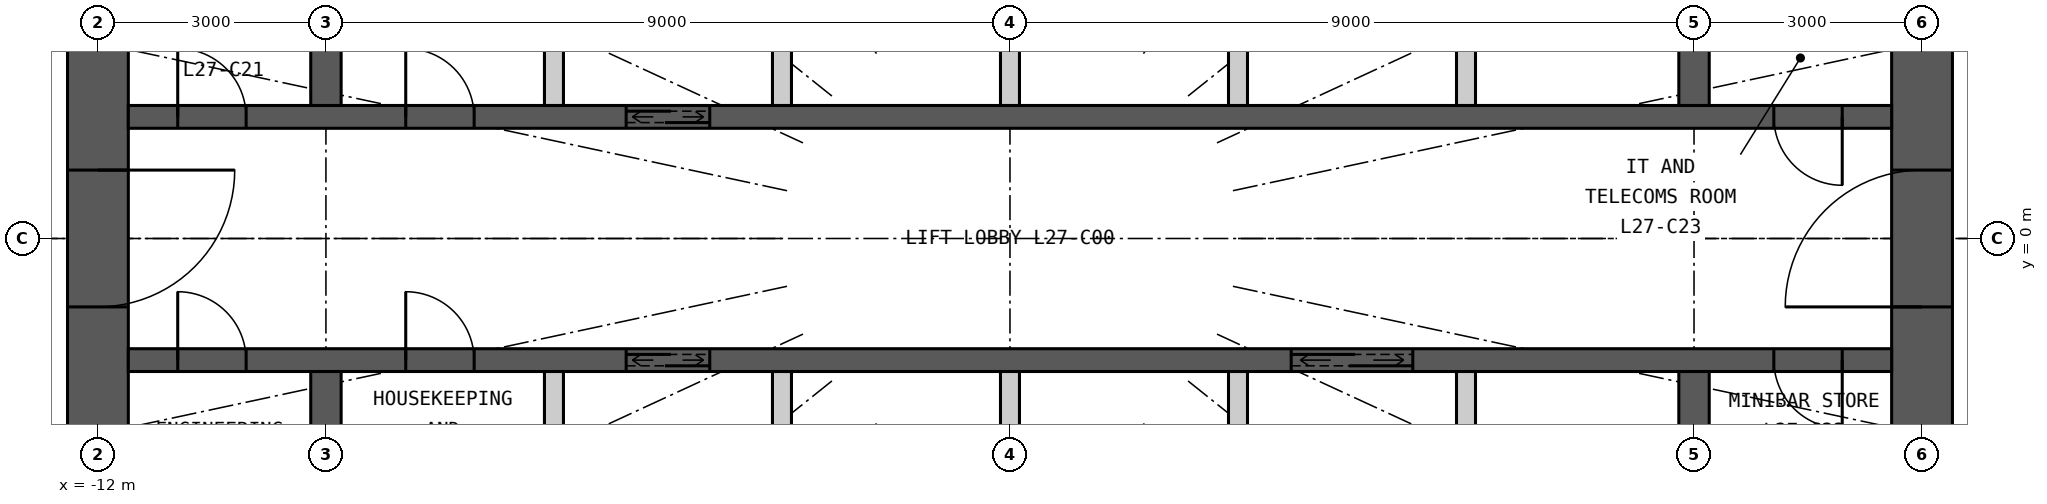
"""IFC4 building model, lengths in metres.
Left out: names, types, materials, properties, quantities, classifications, styles, units other than length and angle.
Written with IfcOpenShell. Run it as: python <this file> out.ifc"""

import sys

from ifc_helpers import new_model, si_unit, direction, frame, frame_2d, origin, place, context, subcontext, project, spatial, rectangle, extrude, element, fill, save


model = new_model("IFC4")
c1 = context("Model", 3, precision=1e-05, world=origin(), true_north=direction((0.0, 1.0)))
c2 = subcontext(c1, "Body", "Model", "MODEL_VIEW")
j1 = project(units=[si_unit("LENGTHUNIT", "METRE"), si_unit("PLANEANGLEUNIT", "RADIAN")], contexts=[c1])
p1 = place(None, origin())
s1 = spatial("IfcSite", under=j1, at=p1, CompositionType="ELEMENT")
p2 = place(p1, origin())
s2 = spatial("IfcBuilding", under=s1, at=p2, CompositionType="ELEMENT")
p3 = place(p2, frame((0.0, 0.0, 108.9)))
s3 = spatial("IfcBuildingStorey", under=s2, at=p3, CompositionType="ELEMENT", Elevation=108.9)
p4 = place(p3, frame((12.0, -7.6, 0.0), z_axis=(0.0, 0.0, 1.0), x_axis=(0.0, 1.0, 0.0)))
e1 = element("IfcWall", 1, at=p4, inside=s3, PredefinedType="SHEAR", context=c2, shape_type="SweptSolid", body=[
    extrude(rectangle(XDim=15.2, YDim=0.8, at=frame_2d((7.6, 0.0))), origin(), (0.0, 0.0, 1.0), 3.3),
])
p5 = place(p4, frame((6.7, 0.0, 0.0)))
e2 = element("IfcOpeningElement", 2, at=p5, cuts=e1, PredefinedType="OPENING", context=c2, shape_type="SweptSolid", body=[
    extrude(rectangle(XDim=1.8, YDim=2.2, at=frame_2d((0.9, 1.1))), frame((0.0, 0.41, 0.0), z_axis=(0.0, -1.0, 0.0), x_axis=(1.0, 0.0, 0.0)), (0.0, 0.0, 1.0), 0.82),
])
p6 = place(p3, frame((-12.0, 7.6, 0.0), z_axis=(0.0, 0.0, 1.0), x_axis=(0.0, -1.0, 0.0)))
e3 = element("IfcWall", 3, at=p6, inside=s3, PredefinedType="SHEAR", context=c2, shape_type="SweptSolid", body=[
    extrude(rectangle(XDim=15.2, YDim=0.8, at=frame_2d((7.6, 0.0))), origin(), (0.0, 0.0, 1.0), 3.3),
])
p7 = place(p6, frame((6.7, 0.0, 0.0)))
e4 = element("IfcOpeningElement", 4, at=p7, cuts=e3, PredefinedType="OPENING", context=c2, shape_type="SweptSolid", body=[
    extrude(rectangle(XDim=1.8, YDim=2.2, at=frame_2d((0.9, 1.1))), frame((0.0, 0.41, 0.0), z_axis=(0.0, -1.0, 0.0), x_axis=(1.0, 0.0, 0.0)), (0.0, 0.0, 1.0), 0.82),
])
p8 = place(p3, frame((-11.6, 1.6, 0.0), z_axis=(0.0, 0.0, 1.0), x_axis=(1.0, 0.0, 0.0)))
e5 = element("IfcWall", 5, at=p8, inside=s3, PredefinedType="SHEAR", context=c2, shape_type="SweptSolid", body=[
    extrude(rectangle(XDim=23.2, YDim=0.3, at=frame_2d((11.6, 0.0))), origin(), (0.0, 0.0, 1.0), 3.3),
])
p9 = place(p8, frame((6.55, 0.0, 0.0)))
e6 = element("IfcOpeningElement", 6, at=p9, cuts=e5, PredefinedType="OPENING", context=c2, shape_type="SweptSolid", body=[
    extrude(rectangle(XDim=1.1, YDim=2.2, at=frame_2d((0.55, 1.1))), frame((0.0, 0.16, 0.0), z_axis=(0.0, -1.0, 0.0), x_axis=(1.0, 0.0, 0.0)), (0.0, 0.0, 1.0), 0.32),
])
p10 = place(p8, frame((0.65, 0.0, 0.0)))
e7 = element("IfcOpeningElement", 7, at=p10, cuts=e5, PredefinedType="OPENING", context=c2, shape_type="SweptSolid", body=[
    extrude(rectangle(XDim=0.9, YDim=2.2, at=frame_2d((0.45, 1.1))), frame((0.0, 0.16, 0.0), z_axis=(0.0, -1.0, 0.0), x_axis=(1.0, 0.0, 0.0)), (0.0, 0.0, 1.0), 0.32),
])
p11 = place(p8, frame((3.65, 0.0, 0.0)))
e8 = element("IfcOpeningElement", 8, at=p11, cuts=e5, PredefinedType="OPENING", context=c2, shape_type="SweptSolid", body=[
    extrude(rectangle(XDim=0.9, YDim=2.2, at=frame_2d((0.45, 1.1))), frame((0.0, 0.16, 0.0), z_axis=(0.0, -1.0, 0.0), x_axis=(1.0, 0.0, 0.0)), (0.0, 0.0, 1.0), 0.32),
])
p12 = place(p8, frame((21.65, 0.0, 0.0)))
e9 = element("IfcOpeningElement", 9, at=p12, cuts=e5, PredefinedType="OPENING", context=c2, shape_type="SweptSolid", body=[
    extrude(rectangle(XDim=0.9, YDim=2.2, at=frame_2d((0.45, 1.1))), frame((0.0, 0.16, 0.0), z_axis=(0.0, -1.0, 0.0), x_axis=(1.0, 0.0, 0.0)), (0.0, 0.0, 1.0), 0.32),
])
p13 = place(p3, frame((-11.6, -1.6, 0.0), z_axis=(0.0, 0.0, 1.0), x_axis=(1.0, 0.0, 0.0)))
e10 = element("IfcWall", 10, at=p13, inside=s3, PredefinedType="SHEAR", context=c2, shape_type="SweptSolid", body=[
    extrude(rectangle(XDim=23.2, YDim=0.3, at=frame_2d((11.6, 0.0))), origin(), (0.0, 0.0, 1.0), 3.3),
])
p14 = place(p13, frame((6.55, 0.0, 0.0)))
e11 = element("IfcOpeningElement", 11, at=p14, cuts=e10, PredefinedType="OPENING", context=c2, shape_type="SweptSolid", body=[
    extrude(rectangle(XDim=1.1, YDim=2.2, at=frame_2d((0.55, 1.1))), frame((0.0, 0.16, 0.0), z_axis=(0.0, -1.0, 0.0), x_axis=(1.0, 0.0, 0.0)), (0.0, 0.0, 1.0), 0.32),
])
p15 = place(p13, frame((15.3, 0.0, 0.0)))
e12 = element("IfcOpeningElement", 12, at=p15, cuts=e10, PredefinedType="OPENING", context=c2, shape_type="SweptSolid", body=[
    extrude(rectangle(XDim=1.6, YDim=2.4, at=frame_2d((0.8, 1.2))), frame((0.0, 0.16, 0.0), z_axis=(0.0, -1.0, 0.0), x_axis=(1.0, 0.0, 0.0)), (0.0, 0.0, 1.0), 0.32),
])
p16 = place(p13, frame((0.65, 0.0, 0.0)))
e13 = element("IfcOpeningElement", 13, at=p16, cuts=e10, PredefinedType="OPENING", context=c2, shape_type="SweptSolid", body=[
    extrude(rectangle(XDim=0.9, YDim=2.2, at=frame_2d((0.45, 1.1))), frame((0.0, 0.16, 0.0), z_axis=(0.0, -1.0, 0.0), x_axis=(1.0, 0.0, 0.0)), (0.0, 0.0, 1.0), 0.32),
])
p17 = place(p13, frame((3.65, 0.0, 0.0)))
e14 = element("IfcOpeningElement", 14, at=p17, cuts=e10, PredefinedType="OPENING", context=c2, shape_type="SweptSolid", body=[
    extrude(rectangle(XDim=0.9, YDim=2.2, at=frame_2d((0.45, 1.1))), frame((0.0, 0.16, 0.0), z_axis=(0.0, -1.0, 0.0), x_axis=(1.0, 0.0, 0.0)), (0.0, 0.0, 1.0), 0.32),
])
p18 = place(p13, frame((21.65, 0.0, 0.0)))
e15 = element("IfcOpeningElement", 15, at=p18, cuts=e10, PredefinedType="OPENING", context=c2, shape_type="SweptSolid", body=[
    extrude(rectangle(XDim=0.9, YDim=2.2, at=frame_2d((0.45, 1.1))), frame((0.0, 0.16, 0.0), z_axis=(0.0, -1.0, 0.0), x_axis=(1.0, 0.0, 0.0)), (0.0, 0.0, 1.0), 0.32),
])
for number, where, z_axis, x_axis in (
    (16, (-9.0, 1.75, 0.0), (0.0, 0.0, 1.0), (0.0, 1.0, 0.0)),
    (17, (-9.0, -4.1, 0.0), (0.0, 0.0, 1.0), (0.0, 1.0, 0.0)),
    (18, (9.0, 1.75, 0.0), (0.0, 0.0, 1.0), (0.0, 1.0, 0.0)),
    (19, (9.0, -4.1, 0.0), (0.0, 0.0, 1.0), (0.0, 1.0, 0.0)),
):
    element("IfcWall", number, at=place(p3, frame(where, z_axis=z_axis, x_axis=x_axis)), inside=s3, PredefinedType="SHEAR", context=c2, shape_type="SweptSolid", body=[
        extrude(rectangle(XDim=2.35, YDim=0.4, at=frame_2d((1.175, 0.0))), origin(), (0.0, 0.0, 1.0), 3.3),
    ])
for number, where, z_axis, x_axis in (
    (20, (-6.0, 1.75, 0.0), (0.0, 0.0, 1.0), (0.0, 1.0, 0.0)),
    (21, (-3.0, 1.75, 0.0), (0.0, 0.0, 1.0), (0.0, 1.0, 0.0)),
    (22, (0.0, 1.75, 0.0), (0.0, 0.0, 1.0), (0.0, 1.0, 0.0)),
    (23, (3.0, 1.75, 0.0), (0.0, 0.0, 1.0), (0.0, 1.0, 0.0)),
    (24, (6.0, 1.75, 0.0), (0.0, 0.0, 1.0), (0.0, 1.0, 0.0)),
    (25, (-6.0, -4.1, 0.0), (0.0, 0.0, 1.0), (0.0, 1.0, 0.0)),
    (26, (-3.0, -4.1, 0.0), (0.0, 0.0, 1.0), (0.0, 1.0, 0.0)),
    (27, (0.0, -4.1, 0.0), (0.0, 0.0, 1.0), (0.0, 1.0, 0.0)),
    (28, (3.0, -4.1, 0.0), (0.0, 0.0, 1.0), (0.0, 1.0, 0.0)),
    (29, (6.0, -4.1, 0.0), (0.0, 0.0, 1.0), (0.0, 1.0, 0.0)),
):
    element("IfcWall", number, at=place(p3, frame(where, z_axis=z_axis, x_axis=x_axis)), inside=s3, PredefinedType="PARTITIONING", context=c2, shape_type="SweptSolid", body=[
        extrude(rectangle(XDim=2.35, YDim=0.25, at=frame_2d((1.175, 0.0))), origin(), (0.0, 0.0, 1.0), 3.3),
    ])
p19 = place(p9, origin())
e30 = element("IfcDoor", 30, at=p19, inside=s3, OperationType="DOUBLE_DOOR_SLIDING", PredefinedType="DOOR", context=c2, shape_type="SweptSolid", body=[
    extrude(rectangle(XDim=1.1, YDim=2.2, at=frame_2d((0.55, 1.1))), frame((0.0, 0.025, 0.0), z_axis=(0.0, -1.0, 0.0), x_axis=(1.0, 0.0, 0.0)), (0.0, 0.0, 1.0), 0.05),
])
fill(e6, e30)
p20 = place(p14, origin())
e31 = element("IfcDoor", 31, at=p20, inside=s3, OperationType="DOUBLE_DOOR_SLIDING", PredefinedType="DOOR", context=c2, shape_type="SweptSolid", body=[
    extrude(rectangle(XDim=1.1, YDim=2.2, at=frame_2d((0.55, 1.1))), frame((0.0, 0.025, 0.0), z_axis=(0.0, -1.0, 0.0), x_axis=(1.0, 0.0, 0.0)), (0.0, 0.0, 1.0), 0.05),
])
fill(e11, e31)
p21 = place(p15, origin())
e32 = element("IfcDoor", 32, at=p21, inside=s3, OperationType="DOUBLE_DOOR_SLIDING", PredefinedType="DOOR", context=c2, shape_type="SweptSolid", body=[
    extrude(rectangle(XDim=1.6, YDim=2.4, at=frame_2d((0.8, 1.2))), frame((0.0, 0.025, 0.0), z_axis=(0.0, -1.0, 0.0), x_axis=(1.0, 0.0, 0.0)), (0.0, 0.0, 1.0), 0.05),
])
fill(e12, e32)
p22 = place(p10, origin())
e33 = element("IfcDoor", 33, at=p22, inside=s3, OperationType="SINGLE_SWING_LEFT", PredefinedType="DOOR", context=c2, shape_type="SweptSolid", body=[
    extrude(rectangle(XDim=0.9, YDim=2.2, at=frame_2d((0.45, 1.1))), frame((0.0, 0.025, 0.0), z_axis=(0.0, -1.0, 0.0), x_axis=(1.0, 0.0, 0.0)), (0.0, 0.0, 1.0), 0.05),
])
fill(e7, e33)
p23 = place(p11, origin())
e34 = element("IfcDoor", 34, at=p23, inside=s3, OperationType="SINGLE_SWING_LEFT", PredefinedType="DOOR", context=c2, shape_type="SweptSolid", body=[
    extrude(rectangle(XDim=0.9, YDim=2.2, at=frame_2d((0.45, 1.1))), frame((0.0, 0.025, 0.0), z_axis=(0.0, -1.0, 0.0), x_axis=(1.0, 0.0, 0.0)), (0.0, 0.0, 1.0), 0.05),
])
fill(e8, e34)
p24 = place(p12, origin())
e35 = element("IfcDoor", 35, at=p24, inside=s3, OperationType="SINGLE_SWING_RIGHT", PredefinedType="DOOR", context=c2, shape_type="SweptSolid", body=[
    extrude(rectangle(XDim=0.9, YDim=2.2, at=frame_2d((0.45, 1.1))), frame((0.0, 0.025, 0.0), z_axis=(0.0, -1.0, 0.0), x_axis=(1.0, 0.0, 0.0)), (0.0, 0.0, 1.0), 0.05),
])
fill(e9, e35)
p25 = place(p16, origin())
e36 = element("IfcDoor", 36, at=p25, inside=s3, OperationType="SINGLE_SWING_LEFT", PredefinedType="DOOR", context=c2, shape_type="SweptSolid", body=[
    extrude(rectangle(XDim=0.9, YDim=2.2, at=frame_2d((0.45, 1.1))), frame((0.0, 0.025, 0.0), z_axis=(0.0, -1.0, 0.0), x_axis=(1.0, 0.0, 0.0)), (0.0, 0.0, 1.0), 0.05),
])
fill(e13, e36)
p26 = place(p17, origin())
e37 = element("IfcDoor", 37, at=p26, inside=s3, OperationType="SINGLE_SWING_LEFT", PredefinedType="DOOR", context=c2, shape_type="SweptSolid", body=[
    extrude(rectangle(XDim=0.9, YDim=2.2, at=frame_2d((0.45, 1.1))), frame((0.0, 0.025, 0.0), z_axis=(0.0, -1.0, 0.0), x_axis=(1.0, 0.0, 0.0)), (0.0, 0.0, 1.0), 0.05),
])
fill(e14, e37)
p27 = place(p18, origin())
e38 = element("IfcDoor", 38, at=p27, inside=s3, OperationType="SINGLE_SWING_RIGHT", PredefinedType="DOOR", context=c2, shape_type="SweptSolid", body=[
    extrude(rectangle(XDim=0.9, YDim=2.2, at=frame_2d((0.45, 1.1))), frame((0.0, 0.025, 0.0), z_axis=(0.0, -1.0, 0.0), x_axis=(1.0, 0.0, 0.0)), (0.0, 0.0, 1.0), 0.05),
])
fill(e15, e38)
p28 = place(p5, origin())
e39 = element("IfcDoor", 39, at=p28, inside=s3, OperationType="DOUBLE_DOOR_DOUBLE_SWING", PredefinedType="DOOR", context=c2, shape_type="SweptSolid", body=[
    extrude(rectangle(XDim=1.8, YDim=2.2, at=frame_2d((0.9, 1.1))), frame((0.0, 0.025, 0.0), z_axis=(0.0, -1.0, 0.0), x_axis=(1.0, 0.0, 0.0)), (0.0, 0.0, 1.0), 0.05),
])
fill(e2, e39)
p29 = place(p7, origin())
e40 = element("IfcDoor", 40, at=p29, inside=s3, OperationType="DOUBLE_DOOR_DOUBLE_SWING", PredefinedType="DOOR", context=c2, shape_type="SweptSolid", body=[
    extrude(rectangle(XDim=1.8, YDim=2.2, at=frame_2d((0.9, 1.1))), frame((0.0, 0.025, 0.0), z_axis=(0.0, -1.0, 0.0), x_axis=(1.0, 0.0, 0.0)), (0.0, 0.0, 1.0), 0.05),
])
fill(e4, e40)
save(model, sys.argv[1])
